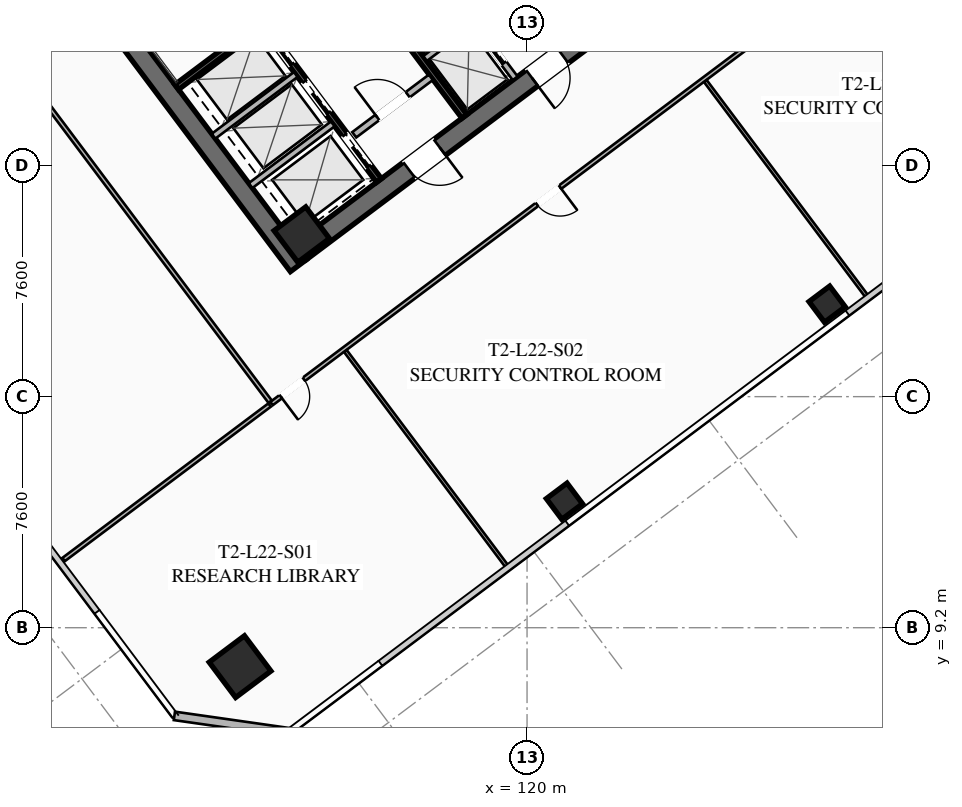
"""IFC4 building model, lengths in metres.
Left out: names, types, materials, properties, quantities, classifications, styles, units other than length and angle.
Written with IfcOpenShell. Run it as: python <this file> out.ifc"""

import sys

from ifc_helpers import new_model, si_unit, direction, frame, frame_2d, origin, origin_2d, place, context, subcontext, project, spatial, rectangle, hollow_rectangle, extrude, element, fill, save


model = new_model("IFC4")
c1 = context("Model", 3, precision=1e-05, world=origin(), true_north=direction((0.0, 1.0)))
c2 = subcontext(c1, "Body", "Model", "MODEL_VIEW")
j1 = project(units=[si_unit("LENGTHUNIT", "METRE"), si_unit("PLANEANGLEUNIT", "RADIAN")], contexts=[c1])
p1 = place(None, origin())
s1 = spatial("IfcSite", under=j1, at=p1, CompositionType="ELEMENT")
p2 = place(p1, origin())
s2 = spatial("IfcBuilding", under=s1, at=p2, CompositionType="ELEMENT")
p3 = place(p2, frame((0.0, 0.0, 84.95)))
s3 = spatial("IfcBuildingStorey", under=s2, at=p3, CompositionType="ELEMENT", Elevation=84.95)
p4 = place(p3, frame((112.476, 21.107, 0.0), z_axis=(0.0, 0.0, 1.0), x_axis=(-0.600005007985, 0.799996243986, 0.0)))
e1 = element("IfcWall", 1, at=p4, inside=s3, PredefinedType="SHEAR", context=c2, shape_type="SweptSolid", body=[
    extrude(rectangle(XDim=15.6, YDim=0.65, at=frame_2d((7.8, 0.0))), origin(), (0.0, 0.0, 1.0), 3.55),
])
p5 = place(p3, frame((124.429, 30.478, 0.0), z_axis=(0.0, 0.0, 1.0), x_axis=(-0.799998028465, -0.600002628705, 0.0)))
e2 = element("IfcWall", 2, at=p5, inside=s3, PredefinedType="SHEAR", context=c2, shape_type="SweptSolid", body=[
    extrude(rectangle(XDim=14.86, YDim=0.65, at=frame_2d((7.43, 0.0))), origin(), (0.0, 0.0, 1.0), 3.55),
])
p6 = place(p5, frame((9.13, 0.0, 0.0)))
e3 = element("IfcOpeningElement", 3, at=p6, cuts=e2, PredefinedType="OPENING", context=c2, shape_type="SweptSolid", body=[
    extrude(rectangle(XDim=1.25, YDim=2.25, at=frame_2d((0.625, 1.125))), frame((0.0, 0.335, 0.0), z_axis=(0.0, -1.0, 0.0), x_axis=(1.0, 0.0, 0.0)), (0.0, 0.0, 1.0), 0.67),
])
p7 = place(p5, frame((4.08, 0.0, 0.0)))
e4 = element("IfcOpeningElement", 4, at=p7, cuts=e2, PredefinedType="OPENING", context=c2, shape_type="SweptSolid", body=[
    extrude(rectangle(XDim=1.25, YDim=2.25, at=frame_2d((0.625, 1.125))), frame((0.0, 0.335, 0.0), z_axis=(0.0, -1.0, 0.0), x_axis=(1.0, 0.0, 0.0)), (0.0, 0.0, 1.0), 0.67),
])
p8 = place(p3, frame((112.59, 22.13, 0.0), z_axis=(0.0, 0.0, 1.0), x_axis=(0.799999996291, 0.600000004945, 0.0)))
e5 = element("IfcColumn", 5, at=p8, inside=s3, PredefinedType="COLUMN", context=c2, shape_type="SweptSolid", body=[
    extrude(hollow_rectangle(XDim=1.3, YDim=1.3, WallThickness=0.05, at=origin_2d()), origin(), (0.0, 0.0, 1.0), 3.35),
])
p9 = place(p3, frame((110.56, 7.92, 0.0), z_axis=(0.0, 0.0, 1.0), x_axis=(0.799999996291, 0.600000004945, 0.0)))
e6 = element("IfcColumn", 6, at=p9, inside=s3, PredefinedType="COLUMN", context=c2, shape_type="SweptSolid", body=[
    extrude(hollow_rectangle(XDim=1.45, YDim=1.45, WallThickness=0.055, at=origin_2d()), origin(), (0.0, 0.0, 1.0), 3.35),
])
for number, where, z_axis, x_axis in (
    (7, (121.23, 13.36, 0.0), (0.0, 0.0, 1.0), (0.8, 0.6, 0.0)),
    (8, (129.87, 19.84, 0.0), (0.0, 0.0, 1.0), (0.8, 0.6, 0.0)),
):
    element("IfcColumn", number, at=place(p3, frame(where, z_axis=z_axis, x_axis=x_axis)), inside=s3, PredefinedType="COLUMN", context=c2, shape_type="SweptSolid", body=[
        extrude(hollow_rectangle(XDim=0.85, YDim=0.85, WallThickness=0.035, at=origin_2d()), origin(), (0.0, 0.0, 1.0), 3.35),
    ])
p10 = place(p3, frame((112.18, 5.76, 0.0), z_axis=(0.0, 0.0, 1.0), x_axis=(-0.989948214866, 0.141430307517, 0.0)))
e9 = element("IfcWall", 9, at=p10, inside=s3, PredefinedType="SOLIDWALL", context=c2, shape_type="SweptSolid", body=[
    extrude(rectangle(XDim=3.818, YDim=0.28, at=frame_2d((1.909, 0.0))), origin(), (0.0, 0.0, 1.0), 3.35),
])
p11 = place(p3, frame((108.476, 26.982, 0.0), z_axis=(0.0, 0.0, 1.0), x_axis=(0.799984290658, 0.600020945218, 0.0)))
e10 = element("IfcWall", 10, at=p11, inside=s3, PredefinedType="SHEAR", context=c2, shape_type="SweptSolid", body=[
    extrude(rectangle(XDim=3.73, YDim=0.2, at=frame_2d((1.865, 0.0))), origin(), (0.0, 0.0, 1.0), 3.35),
])
p12 = place(p3, frame((117.938, 26.016, 0.0), z_axis=(0.0, 0.0, 1.0), x_axis=(-0.600005463273, 0.799995902516, 0.0)))
e11 = element("IfcWall", 11, at=p12, inside=s3, PredefinedType="SHEAR", context=c2, shape_type="SweptSolid", body=[
    extrude(rectangle(XDim=14.3, YDim=0.2, at=frame_2d((7.15, 0.0))), origin(), (0.0, 0.0, 1.0), 3.35),
])
p13 = place(p3, frame((114.316, 25.412, 0.0), z_axis=(0.0, 0.0, 1.0), x_axis=(0.800018601094, 0.59997519774, 0.0)))
e12 = element("IfcWall", 12, at=p13, inside=s3, PredefinedType="SOLIDWALL", context=c2, shape_type="SweptSolid", body=[
    extrude(rectangle(XDim=3.15, YDim=0.22, at=frame_2d((1.575, 0.0))), origin(), (0.0, 0.0, 1.0), 2.703),
])
p14 = place(p13, frame((0.95, 0.0, 0.0)))
e13 = element("IfcOpeningElement", 13, at=p14, cuts=e12, PredefinedType="OPENING", context=c2, shape_type="SweptSolid", body=[
    extrude(rectangle(XDim=1.25, YDim=2.25, at=frame_2d((0.625, 1.125))), frame((0.0, 0.12, 0.0), z_axis=(0.0, -1.0, 0.0), x_axis=(1.0, 0.0, 0.0)), (0.0, 0.0, 1.0), 0.24),
])
p15 = place(p3, frame((115.13, 23.91, 0.0), z_axis=(0.0, 0.0, 1.0), x_axis=(-0.599975393228, 0.800018454488, 0.0)))
e14 = element("IfcWall", 14, at=p15, inside=s3, PredefinedType="SHEAR", context=c2, shape_type="SweptSolid", body=[
    extrude(rectangle(XDim=6.35, YDim=0.2, at=frame_2d((3.175, 0.0))), origin(), (0.0, 0.0, 1.0), 3.35),
])
p16 = place(p15, frame((4.775, 0.0, 0.0)))
e15 = element("IfcOpeningElement", 15, at=p16, cuts=e14, PredefinedType="OPENING", context=c2, shape_type="SweptSolid", body=[
    extrude(rectangle(XDim=1.3, YDim=2.25, at=frame_2d((0.65, 1.125))), frame((0.0, 0.11, 0.0), z_axis=(0.0, -1.0, 0.0), x_axis=(1.0, 0.0, 0.0)), (0.0, 0.0, 1.0), 0.22),
])
p17 = place(p15, frame((2.775, 0.0, 0.0)))
e16 = element("IfcOpeningElement", 16, at=p17, cuts=e14, PredefinedType="OPENING", context=c2, shape_type="SweptSolid", body=[
    extrude(rectangle(XDim=1.3, YDim=2.25, at=frame_2d((0.65, 1.125))), frame((0.0, 0.11, 0.0), z_axis=(0.0, -1.0, 0.0), x_axis=(1.0, 0.0, 0.0)), (0.0, 0.0, 1.0), 0.22),
])
p18 = place(p15, frame((0.575, 0.0, 0.0)))
e17 = element("IfcOpeningElement", 17, at=p18, cuts=e14, PredefinedType="OPENING", context=c2, shape_type="SweptSolid", body=[
    extrude(rectangle(XDim=1.3, YDim=2.25, at=frame_2d((0.65, 1.125))), frame((0.0, 0.11, 0.0), z_axis=(0.0, -1.0, 0.0), x_axis=(1.0, 0.0, 0.0)), (0.0, 0.0, 1.0), 0.22),
])
for number, where, z_axis, x_axis in (
    (18, (110.906, 23.742, 0.0), (0.0, 0.0, 1.0), (0.8, 0.6, 0.0)),
    (19, (109.688, 25.366, 0.0), (0.0, 0.0, 1.0), (0.8, 0.6, 0.0)),
):
    element("IfcWall", number, at=place(p3, frame(where, z_axis=z_axis, x_axis=x_axis)), inside=s3, PredefinedType="SOLIDWALL", context=c2, shape_type="SweptSolid", body=[
        extrude(rectangle(XDim=3.38, YDim=0.2, at=frame_2d((1.69, 0.0))), origin(), (0.0, 0.0, 1.0), 3.35),
    ])
p19 = place(p3, frame((119.61, 27.27, 0.0), z_axis=(0.0, 0.0, 1.0), x_axis=(-0.600011488909, 0.79999138319, 0.0)))
e20 = element("IfcWall", 20, at=p19, inside=s3, PredefinedType="SOLIDWALL", context=c2, shape_type="SweptSolid", body=[
    extrude(rectangle(XDim=6.8, YDim=0.2, at=frame_2d((3.4, 0.0))), origin(), (0.0, 0.0, 1.0), 3.35),
])
p20 = place(p19, frame((0.625, 0.0, 0.0)))
e21 = element("IfcOpeningElement", 21, at=p20, cuts=e20, PredefinedType="OPENING", context=c2, shape_type="SweptSolid", body=[
    extrude(rectangle(XDim=1.1, YDim=2.2, at=frame_2d((0.55, 1.1))), frame((0.0, 0.11, 0.0), z_axis=(0.0, -1.0, 0.0), x_axis=(1.0, 0.0, 0.0)), (0.0, 0.0, 1.0), 0.22),
])
p21 = place(p19, frame((2.875, 0.0, 0.0)))
e22 = element("IfcOpeningElement", 22, at=p21, cuts=e20, PredefinedType="OPENING", context=c2, shape_type="SweptSolid", body=[
    extrude(rectangle(XDim=1.1, YDim=2.2, at=frame_2d((0.55, 1.1))), frame((0.0, 0.11, 0.0), z_axis=(0.0, -1.0, 0.0), x_axis=(1.0, 0.0, 0.0)), (0.0, 0.0, 1.0), 0.22),
])
p22 = place(p19, frame((5.125, 0.0, 0.0)))
e23 = element("IfcOpeningElement", 23, at=p22, cuts=e20, PredefinedType="OPENING", context=c2, shape_type="SweptSolid", body=[
    extrude(rectangle(XDim=1.1, YDim=2.2, at=frame_2d((0.55, 1.1))), frame((0.0, 0.11, 0.0), z_axis=(0.0, -1.0, 0.0), x_axis=(1.0, 0.0, 0.0)), (0.0, 0.0, 1.0), 0.22),
])
p23 = place(p3, frame((116.646, 27.922, 0.0), z_axis=(0.0, 0.0, 1.0), x_axis=(0.8, 0.6, 0.0)))
e24 = element("IfcWall", 24, at=p23, inside=s3, PredefinedType="SOLIDWALL", context=c2, shape_type="SweptSolid", body=[
    extrude(rectangle(XDim=1.88, YDim=0.2, at=frame_2d((0.94, 0.0))), origin(), (0.0, 0.0, 1.0), 3.35),
])
p24 = place(p3, frame((134.18, 33.51, 0.0), z_axis=(0.0, 0.0, 1.0), x_axis=(-0.8, -0.6, 0.0)))
e25 = element("IfcWall", 25, at=p24, inside=s3, PredefinedType="PARTITIONING", context=c2, shape_type="SweptSolid", body=[
    extrude(rectangle(XDim=28.23, YDim=0.135, at=frame_2d((14.115, 0.0))), origin(), (0.0, 0.0, 1.0), 2.703),
])
p25 = place(p24, frame((26.9, 0.0, 0.0)))
e26 = element("IfcOpeningElement", 26, at=p25, cuts=e25, PredefinedType="OPENING", context=c2, shape_type="SweptSolid", body=[
    extrude(rectangle(XDim=0.95, YDim=2.05, at=frame_2d((0.475, 1.025))), frame((0.0, 0.077, 0.0), z_axis=(0.0, -1.0, 0.0), x_axis=(1.0, 0.0, 0.0)), (0.0, 0.0, 1.0), 0.155),
])
p26 = place(p24, frame((16.368, 0.0, 0.0)))
e27 = element("IfcOpeningElement", 27, at=p26, cuts=e25, PredefinedType="OPENING", context=c2, shape_type="SweptSolid", body=[
    extrude(rectangle(XDim=0.95, YDim=2.05, at=frame_2d((0.475, 1.025))), frame((0.0, 0.077, 0.0), z_axis=(0.0, -1.0, 0.0), x_axis=(1.0, 0.0, 0.0)), (0.0, 0.0, 1.0), 0.155),
])
p27 = place(p24, frame((0.38, 0.0, 0.0)))
e28 = element("IfcOpeningElement", 28, at=p27, cuts=e25, PredefinedType="OPENING", context=c2, shape_type="SweptSolid", body=[
    extrude(rectangle(XDim=0.95, YDim=2.05, at=frame_2d((0.475, 1.025))), frame((0.0, 0.077, 0.0), z_axis=(0.0, -1.0, 0.0), x_axis=(1.0, 0.0, 0.0)), (0.0, 0.0, 1.0), 0.155),
])
p28 = place(p3, frame((119.368, 11.176, 0.0), z_axis=(0.0, 0.0, 1.0), x_axis=(-0.59999561085, 0.800003291844, 0.0)))
e29 = element("IfcWall", 29, at=p28, inside=s3, PredefinedType="PARTITIONING", context=c2, shape_type="SweptSolid", body=[
    extrude(rectangle(XDim=8.9, YDim=0.11, at=frame_2d((4.45, 0.0))), origin(), (0.0, 0.0, 1.0), 2.703),
])
p29 = place(p3, frame((131.208, 20.056, 0.0), z_axis=(0.0, 0.0, 1.0), x_axis=(-0.6, 0.8, 0.0)))
e30 = element("IfcWall", 30, at=p29, inside=s3, PredefinedType="PARTITIONING", context=c2, shape_type="SweptSolid", body=[
    extrude(rectangle(XDim=8.9, YDim=0.11, at=frame_2d((4.45, 0.0))), origin(), (0.0, 0.0, 1.0), 2.703),
])
p30 = place(p3, frame((111.548, 16.636, 0.0), z_axis=(0.0, 0.0, 1.0), x_axis=(-0.600001780419, 0.799998664682, 0.0)))
e31 = element("IfcWall", 31, at=p30, inside=s3, PredefinedType="PARTITIONING", context=c2, shape_type="SweptSolid", body=[
    extrude(rectangle(XDim=21.94, YDim=0.135, at=frame_2d((10.97, 0.0))), origin(), (0.0, 0.0, 1.0), 2.703),
])
p31 = place(p30, frame((20.69, 0.0, 0.0)))
e32 = element("IfcOpeningElement", 32, at=p31, cuts=e31, PredefinedType="OPENING", context=c2, shape_type="SweptSolid", body=[
    extrude(rectangle(XDim=0.95, YDim=2.05, at=frame_2d((0.475, 1.025))), frame((0.0, 0.077, 0.0), z_axis=(0.0, -1.0, 0.0), x_axis=(1.0, 0.0, 0.0)), (0.0, 0.0, 1.0), 0.155),
])
p32 = place(p3, frame((104.756, 11.442, 0.0), z_axis=(0.0, 0.0, 1.0), x_axis=(0.799993082085, 0.600009223776, 0.0)))
e33 = element("IfcWall", 33, at=p32, inside=s3, PredefinedType="PARTITIONING", context=c2, shape_type="SweptSolid", body=[
    extrude(rectangle(XDim=8.47, YDim=0.135, at=frame_2d((4.235, 0.0))), origin(), (0.0, 0.0, 1.0), 2.703),
])
p33 = place(p6, origin())
e34 = element("IfcDoor", 34, at=p33, inside=s3, OperationType="SINGLE_SWING_LEFT", PredefinedType="DOOR", context=c2, shape_type="SweptSolid", body=[
    extrude(rectangle(XDim=1.25, YDim=2.25, at=frame_2d((0.625, 1.125))), frame((0.0, 0.025, 0.0), z_axis=(0.0, -1.0, 0.0), x_axis=(1.0, 0.0, 0.0)), (0.0, 0.0, 1.0), 0.05),
])
fill(e3, e34)
p34 = place(p7, origin())
e35 = element("IfcDoor", 35, at=p34, inside=s3, OperationType="SINGLE_SWING_RIGHT", PredefinedType="DOOR", context=c2, shape_type="SweptSolid", body=[
    extrude(rectangle(XDim=1.25, YDim=2.25, at=frame_2d((0.625, 1.125))), frame((0.0, 0.025, 0.0), z_axis=(0.0, -1.0, 0.0), x_axis=(1.0, 0.0, 0.0)), (0.0, 0.0, 1.0), 0.05),
])
fill(e4, e35)
p35 = place(p14, origin())
e36 = element("IfcDoor", 36, at=p35, inside=s3, OperationType="SINGLE_SWING_LEFT", PredefinedType="DOOR", context=c2, shape_type="SweptSolid", body=[
    extrude(rectangle(XDim=1.25, YDim=2.25, at=frame_2d((0.625, 1.125))), frame((0.0, 0.025, 0.0), z_axis=(0.0, -1.0, 0.0), x_axis=(1.0, 0.0, 0.0)), (0.0, 0.0, 1.0), 0.05),
])
fill(e13, e36)
p36 = place(p25, origin())
e37 = element("IfcDoor", 37, at=p36, inside=s3, OperationType="SINGLE_SWING_RIGHT", PredefinedType="DOOR", context=c2, shape_type="SweptSolid", body=[
    extrude(rectangle(XDim=0.95, YDim=2.05, at=frame_2d((0.475, 1.025))), frame((0.0, 0.025, 0.0), z_axis=(0.0, -1.0, 0.0), x_axis=(1.0, 0.0, 0.0)), (0.0, 0.0, 1.0), 0.05),
])
fill(e26, e37)
p37 = place(p26, origin())
e38 = element("IfcDoor", 38, at=p37, inside=s3, OperationType="SINGLE_SWING_LEFT", PredefinedType="DOOR", context=c2, shape_type="SweptSolid", body=[
    extrude(rectangle(XDim=0.95, YDim=2.05, at=frame_2d((0.475, 1.025))), frame((0.0, 0.025, 0.0), z_axis=(0.0, -1.0, 0.0), x_axis=(1.0, 0.0, 0.0)), (0.0, 0.0, 1.0), 0.05),
])
fill(e27, e38)
p38 = place(p16, origin())
e39 = element("IfcDoor", 39, at=p38, inside=s3, OperationType="SLIDING_TO_LEFT", PredefinedType="DOOR", context=c2, shape_type="SweptSolid", body=[
    extrude(rectangle(XDim=1.3, YDim=2.25, at=frame_2d((0.65, 1.125))), frame((0.0, 0.025, 0.0), z_axis=(0.0, -1.0, 0.0), x_axis=(1.0, 0.0, 0.0)), (0.0, 0.0, 1.0), 0.05),
])
fill(e15, e39)
p39 = place(p17, origin())
e40 = element("IfcDoor", 40, at=p39, inside=s3, OperationType="SLIDING_TO_LEFT", PredefinedType="DOOR", context=c2, shape_type="SweptSolid", body=[
    extrude(rectangle(XDim=1.3, YDim=2.25, at=frame_2d((0.65, 1.125))), frame((0.0, 0.025, 0.0), z_axis=(0.0, -1.0, 0.0), x_axis=(1.0, 0.0, 0.0)), (0.0, 0.0, 1.0), 0.05),
])
fill(e16, e40)
p40 = place(p18, origin())
e41 = element("IfcDoor", 41, at=p40, inside=s3, OperationType="SLIDING_TO_LEFT", PredefinedType="DOOR", context=c2, shape_type="SweptSolid", body=[
    extrude(rectangle(XDim=1.3, YDim=2.25, at=frame_2d((0.65, 1.125))), frame((0.0, 0.025, 0.0), z_axis=(0.0, -1.0, 0.0), x_axis=(1.0, 0.0, 0.0)), (0.0, 0.0, 1.0), 0.05),
])
fill(e17, e41)
p41 = place(p20, origin())
e42 = element("IfcDoor", 42, at=p41, inside=s3, OperationType="SLIDING_TO_LEFT", PredefinedType="DOOR", context=c2, shape_type="SweptSolid", body=[
    extrude(rectangle(XDim=1.1, YDim=2.2, at=frame_2d((0.55, 1.1))), frame((0.0, 0.025, 0.0), z_axis=(0.0, -1.0, 0.0), x_axis=(1.0, 0.0, 0.0)), (0.0, 0.0, 1.0), 0.05),
])
fill(e21, e42)
save(model, sys.argv[1])
